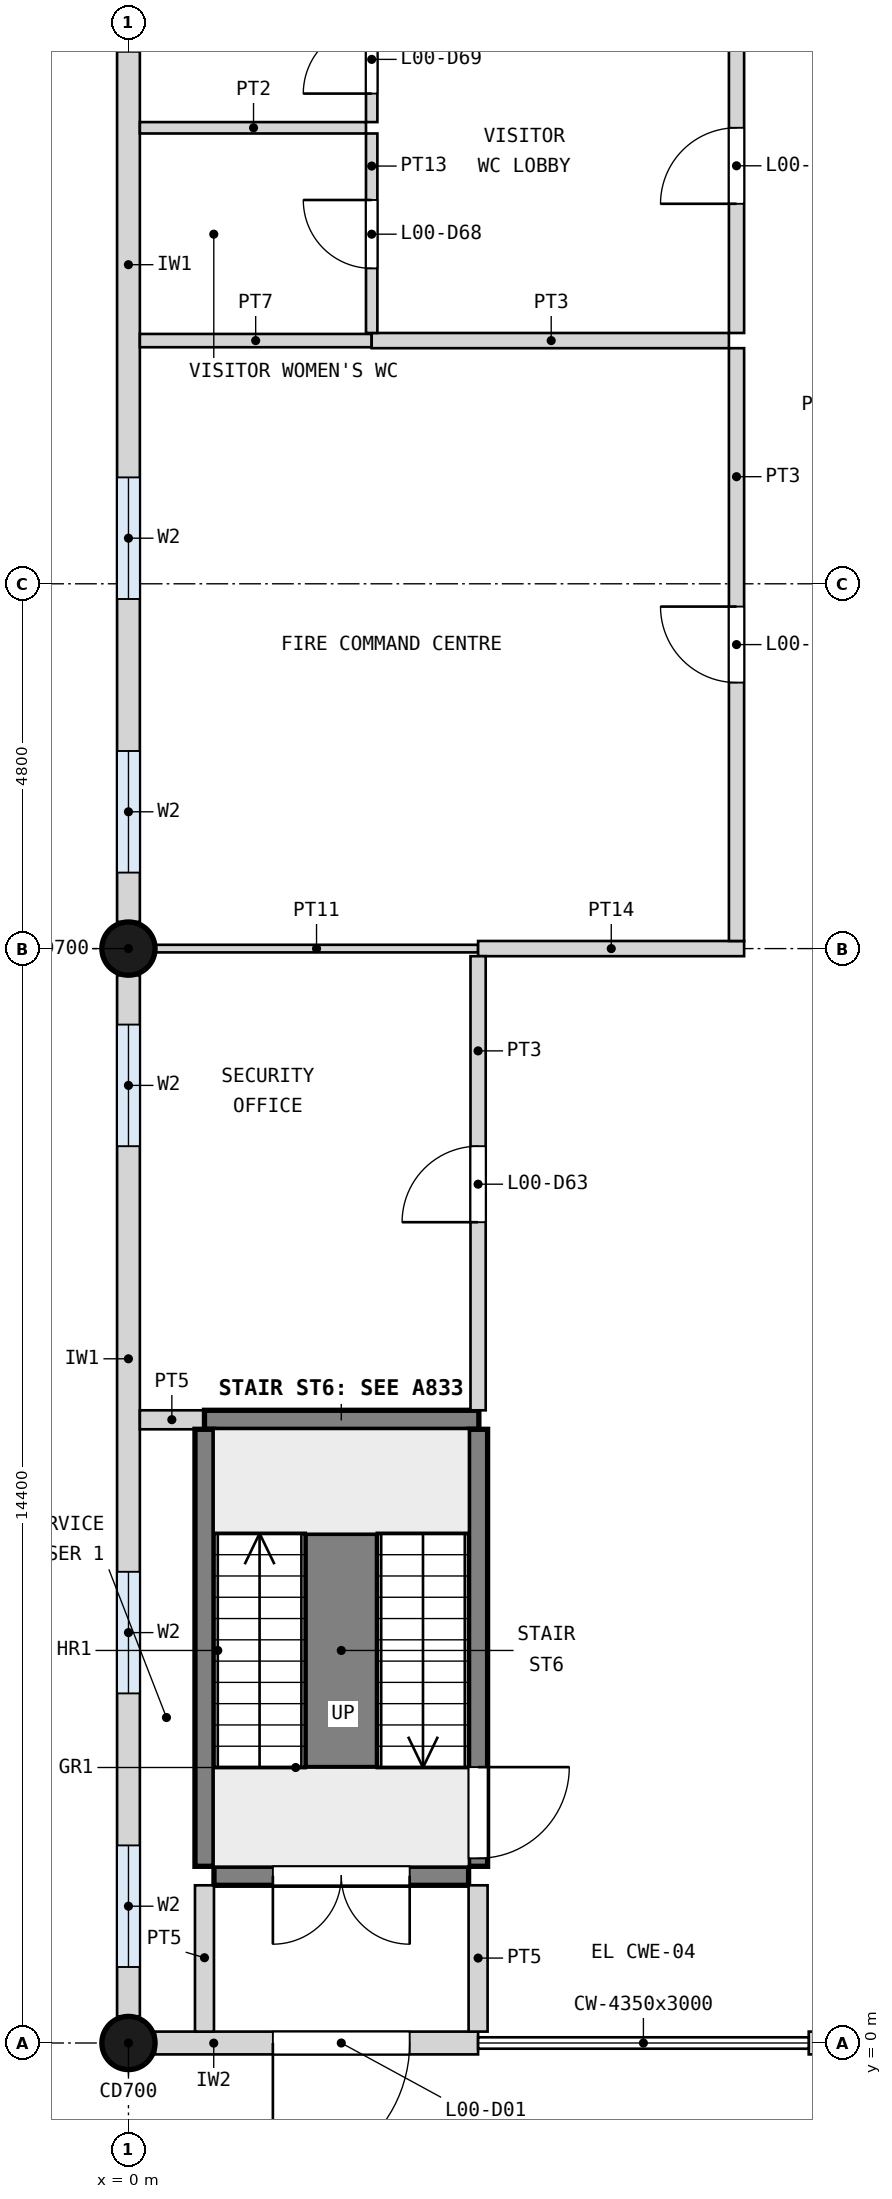
"""IFC4 building model, lengths in metres.
Left out: names, types, materials, properties, quantities, classifications, styles, units other than length and angle.
Written with IfcOpenShell. Run it as: python <this file> out.ifc"""

import sys

from ifc_helpers import new_model, si_unit, direction, frame, frame_2d, origin, origin_2d, place, context, subcontext, project, spatial, rectangle, circle, extrude, element, fill, save


model = new_model("IFC4")
c1 = context("Model", 3, precision=1e-05, world=origin(), true_north=direction((0.0, 1.0)))
c2 = subcontext(c1, "Body", "Model", "MODEL_VIEW")
j1 = project(units=[si_unit("LENGTHUNIT", "METRE"), si_unit("PLANEANGLEUNIT", "RADIAN")], contexts=[c1])
p1 = place(None, origin())
s1 = spatial("IfcSite", under=j1, at=p1, CompositionType="ELEMENT")
p2 = place(p1, origin())
s2 = spatial("IfcBuilding", under=s1, at=p2, CompositionType="ELEMENT")
p3 = place(p2, origin())
s3 = spatial("IfcBuildingStorey", under=s2, at=p3, CompositionType="ELEMENT", Elevation=0.0)
for number, where, z_axis, x_axis in (
    (1, (0.0, 0.0, 0.0), (0.0, 0.0, 1.0), (1.0, 0.0, 0.0)),
    (2, (0.0, 14.4, 0.0), (0.0, 0.0, 1.0), (1.0, 0.0, 0.0)),
):
    element("IfcColumn", number, at=place(p3, frame(where, z_axis=z_axis, x_axis=x_axis)), inside=s3, PredefinedType="COLUMN", context=c2, shape_type="SweptSolid", body=[
        extrude(circle(Radius=0.35, at=origin_2d()), origin(), (0.0, 0.0, 1.0), 4.2),
    ])
p4 = place(p3, frame((0.35, 0.0, 0.0), z_axis=(0.0, 0.0, 1.0), x_axis=(1.0, 0.0, 0.0)))
e3 = element("IfcWall", 3, at=p4, inside=s3, PredefinedType="SOLIDWALL", context=c2, shape_type="SweptSolid", body=[
    extrude(rectangle(XDim=4.25, YDim=0.3, at=frame_2d((2.125, 0.0))), origin(), (0.0, 0.0, 1.0), 3.0),
])
p5 = place(p4, frame((1.55, 0.0, 0.0)))
e4 = element("IfcOpeningElement", 4, at=p5, cuts=e3, PredefinedType="OPENING", context=c2, shape_type="SweptSolid", body=[
    extrude(rectangle(XDim=1.8, YDim=2.1, at=frame_2d((0.9, 1.05))), frame((0.0, 0.16, 0.0), z_axis=(0.0, -1.0, 0.0), x_axis=(1.0, 0.0, 0.0)), (0.0, 0.0, 1.0), 0.32),
])
p6 = place(p3, frame((8.95, 0.0, 0.0), z_axis=(0.0, 0.0, 1.0), x_axis=(1.0, 0.0, 0.0)))
e5 = element("IfcWall", 5, at=p6, inside=s3, PredefinedType="SOLIDWALL", context=c2, shape_type="SweptSolid", body=[
    extrude(rectangle(XDim=2.9, YDim=0.3, at=frame_2d((1.45, 0.0))), origin(), (0.0, 0.0, 1.0), 3.0),
])
p7 = place(p6, frame((0.25, 0.0, 0.0)))
e6 = element("IfcOpeningElement", 6, at=p7, cuts=e5, PredefinedType="OPENING", context=c2, shape_type="SweptSolid", body=[
    extrude(rectangle(XDim=2.4, YDim=2.4, at=frame_2d((1.2, 1.2))), frame((0.0, 0.16, 0.0), z_axis=(0.0, -1.0, 0.0), x_axis=(1.0, 0.0, 0.0)), (0.0, 0.0, 1.0), 0.32),
])
p8 = place(p3, frame((0.0, 0.35, 0.0), z_axis=(0.0, 0.0, 1.0), x_axis=(0.0, 1.0, 0.0)))
e7 = element("IfcWall", 7, at=p8, inside=s3, PredefinedType="SOLIDWALL", context=c2, shape_type="SweptSolid", body=[
    extrude(rectangle(XDim=13.7, YDim=0.3, at=frame_2d((6.85, 0.0))), origin(), (0.0, 0.0, 1.0), 3.0),
])
p9 = place(p8, frame((0.65, 0.0, 0.3)))
e8 = element("IfcOpeningElement", 8, at=p9, cuts=e7, PredefinedType="OPENING", context=c2, shape_type="SweptSolid", body=[
    extrude(rectangle(XDim=1.6, YDim=2.4, at=frame_2d((0.8, 1.2))), frame((0.0, 0.16, 0.0), z_axis=(0.0, -1.0, 0.0), x_axis=(1.0, 0.0, 0.0)), (0.0, 0.0, 1.0), 0.32),
])
p10 = place(p8, frame((4.25, 0.0, 0.3)))
e9 = element("IfcOpeningElement", 9, at=p10, cuts=e7, PredefinedType="OPENING", context=c2, shape_type="SweptSolid", body=[
    extrude(rectangle(XDim=1.6, YDim=2.4, at=frame_2d((0.8, 1.2))), frame((0.0, 0.16, 0.0), z_axis=(0.0, -1.0, 0.0), x_axis=(1.0, 0.0, 0.0)), (0.0, 0.0, 1.0), 0.32),
])
p11 = place(p8, frame((11.45, 0.0, 0.3)))
e10 = element("IfcOpeningElement", 10, at=p11, cuts=e7, PredefinedType="OPENING", context=c2, shape_type="SweptSolid", body=[
    extrude(rectangle(XDim=1.6, YDim=2.4, at=frame_2d((0.8, 1.2))), frame((0.0, 0.16, 0.0), z_axis=(0.0, -1.0, 0.0), x_axis=(1.0, 0.0, 0.0)), (0.0, 0.0, 1.0), 0.32),
])
p12 = place(p3, frame((0.0, 14.75, 0.0), z_axis=(0.0, 0.0, 1.0), x_axis=(0.0, 1.0, 0.0)))
e11 = element("IfcWall", 11, at=p12, inside=s3, PredefinedType="SOLIDWALL", context=c2, shape_type="SweptSolid", body=[
    extrude(rectangle(XDim=13.7, YDim=0.3, at=frame_2d((6.85, 0.0))), origin(), (0.0, 0.0, 1.0), 3.0),
])
p13 = place(p12, frame((0.65, 0.0, 0.3)))
e12 = element("IfcOpeningElement", 12, at=p13, cuts=e11, PredefinedType="OPENING", context=c2, shape_type="SweptSolid", body=[
    extrude(rectangle(XDim=1.6, YDim=2.4, at=frame_2d((0.8, 1.2))), frame((0.0, 0.16, 0.0), z_axis=(0.0, -1.0, 0.0), x_axis=(1.0, 0.0, 0.0)), (0.0, 0.0, 1.0), 0.32),
])
p14 = place(p12, frame((4.25, 0.0, 0.3)))
e13 = element("IfcOpeningElement", 13, at=p14, cuts=e11, PredefinedType="OPENING", context=c2, shape_type="SweptSolid", body=[
    extrude(rectangle(XDim=1.6, YDim=2.4, at=frame_2d((0.8, 1.2))), frame((0.0, 0.16, 0.0), z_axis=(0.0, -1.0, 0.0), x_axis=(1.0, 0.0, 0.0)), (0.0, 0.0, 1.0), 0.32),
])
p15 = place(p12, frame((11.45, 0.0, 0.3)))
e14 = element("IfcOpeningElement", 14, at=p15, cuts=e11, PredefinedType="OPENING", context=c2, shape_type="SweptSolid", body=[
    extrude(rectangle(XDim=1.6, YDim=2.4, at=frame_2d((0.8, 1.2))), frame((0.0, 0.16, 0.0), z_axis=(0.0, -1.0, 0.0), x_axis=(1.0, 0.0, 0.0)), (0.0, 0.0, 1.0), 0.32),
])
p16 = place(p3, frame((1.125, 2.2, 0.0), z_axis=(0.0, 0.0, 1.0), x_axis=(1.0, 0.0, 0.0)))
e15 = element("IfcWall", 15, at=p16, inside=s3, PredefinedType="SHEAR", context=c2, shape_type="SweptSolid", body=[
    extrude(rectangle(XDim=3.35, YDim=0.25, at=frame_2d((1.675, 0.0))), origin(), (0.0, 0.0, 1.0), 3.9),
])
p17 = place(p16, frame((0.775, 0.0, 0.0)))
e16 = element("IfcOpeningElement", 16, at=p17, cuts=e15, PredefinedType="OPENING", context=c2, shape_type="SweptSolid", body=[
    extrude(rectangle(XDim=1.8, YDim=2.1, at=frame_2d((0.9, 1.05))), frame((0.0, 0.135, 0.0), z_axis=(0.0, -1.0, 0.0), x_axis=(1.0, 0.0, 0.0)), (0.0, 0.0, 1.0), 0.27),
])
p18 = place(p3, frame((0.15, 8.2, 0.0), z_axis=(0.0, 0.0, 1.0), x_axis=(1.0, 0.0, 0.0)))
e17 = element("IfcWall", 17, at=p18, inside=s3, PredefinedType="PARTITIONING", context=c2, shape_type="SweptSolid", body=[
    extrude(rectangle(XDim=0.85, YDim=0.25, at=frame_2d((0.425, 0.0))), origin(), (0.0, 0.0, 1.0), 3.9),
])
p19 = place(p3, frame((1.0, 8.2, 0.0), z_axis=(0.0, 0.0, 1.0), x_axis=(1.0, 0.0, 0.0)))
e18 = element("IfcWall", 18, at=p19, inside=s3, PredefinedType="SHEAR", context=c2, shape_type="SweptSolid", body=[
    extrude(rectangle(XDim=3.61, YDim=0.25, at=frame_2d((1.805, 0.0))), origin(), (0.0, 0.0, 1.0), 3.9),
])
p20 = place(p3, frame((0.32, 14.4, 0.0), z_axis=(0.0, 0.0, 1.0), x_axis=(1.0, 0.0, 0.0)))
e19 = element("IfcWall", 19, at=p20, inside=s3, PredefinedType="PARTITIONING", context=c2, shape_type="SweptSolid", body=[
    extrude(rectangle(XDim=4.28, YDim=0.1, at=frame_2d((2.14, 0.0))), origin(), (0.0, 0.0, 1.0), 3.1),
])
p21 = place(p3, frame((4.6, 14.4, 0.0), z_axis=(0.0, 0.0, 1.0), x_axis=(1.0, 0.0, 0.0)))
e20 = element("IfcWall", 20, at=p21, inside=s3, PredefinedType="PARTITIONING", context=c2, shape_type="SweptSolid", body=[
    extrude(rectangle(XDim=3.5, YDim=0.2, at=frame_2d((1.75, 0.0))), origin(), (0.0, 0.0, 1.0), 3.1),
])
p22 = place(p3, frame((0.15, 22.4, 0.0), z_axis=(0.0, 0.0, 1.0), x_axis=(1.0, 0.0, 0.0)))
e21 = element("IfcWall", 21, at=p22, inside=s3, PredefinedType="PARTITIONING", context=c2, shape_type="SweptSolid", body=[
    extrude(rectangle(XDim=3.05, YDim=0.175, at=frame_2d((1.525, 0.0))), origin(), (0.0, 0.0, 1.0), 3.9),
])
p23 = place(p3, frame((3.2, 22.4, 0.0), z_axis=(0.0, 0.0, 1.0), x_axis=(1.0, 0.0, 0.0)))
e22 = element("IfcWall", 22, at=p23, inside=s3, PredefinedType="PARTITIONING", context=c2, shape_type="SweptSolid", body=[
    extrude(rectangle(XDim=4.7, YDim=0.2, at=frame_2d((2.35, 0.0))), origin(), (0.0, 0.0, 1.0), 3.9),
])
p24 = place(p3, frame((0.15, 25.2, 0.0), z_axis=(0.0, 0.0, 1.0), x_axis=(1.0, 0.0, 0.0)))
e23 = element("IfcWall", 23, at=p24, inside=s3, PredefinedType="PARTITIONING", context=c2, shape_type="SweptSolid", body=[
    extrude(rectangle(XDim=2.975, YDim=0.15, at=frame_2d((1.488, 0.0))), origin(), (0.0, 0.0, 1.0), 3.9),
])
p25 = place(p3, frame((1.0, 0.15, 0.0), z_axis=(0.0, 0.0, 1.0), x_axis=(0.0, 1.0, 0.0)))
e24 = element("IfcWall", 24, at=p25, inside=s3, PredefinedType="PARTITIONING", context=c2, shape_type="SweptSolid", body=[
    extrude(rectangle(XDim=1.925, YDim=0.25, at=frame_2d((0.962, 0.0))), origin(), (0.0, 0.0, 1.0), 3.9),
])
p26 = place(p3, frame((1.0, 2.325, 0.0), z_axis=(0.0, 0.0, 1.0), x_axis=(0.0, 1.0, 0.0)))
e25 = element("IfcWall", 25, at=p26, inside=s3, PredefinedType="SHEAR", context=c2, shape_type="SweptSolid", body=[
    extrude(rectangle(XDim=5.75, YDim=0.25, at=frame_2d((2.875, 0.0))), origin(), (0.0, 0.0, 1.0), 3.9),
])
p27 = place(p3, frame((3.2, 22.5, 0.0), z_axis=(0.0, 0.0, 1.0), x_axis=(0.0, 1.0, 0.0)))
e26 = element("IfcWall", 26, at=p27, inside=s3, PredefinedType="PARTITIONING", context=c2, shape_type="SweptSolid", body=[
    extrude(rectangle(XDim=2.625, YDim=0.15, at=frame_2d((1.312, 0.0))), origin(), (0.0, 0.0, 1.0), 3.0),
])
p28 = place(p27, frame((0.85, 0.0, 0.0)))
e27 = element("IfcOpeningElement", 27, at=p28, cuts=e26, PredefinedType="OPENING", context=c2, shape_type="SweptSolid", body=[
    extrude(rectangle(XDim=0.9, YDim=2.1, at=frame_2d((0.45, 1.05))), frame((0.0, 0.085, 0.0), z_axis=(0.0, -1.0, 0.0), x_axis=(1.0, 0.0, 0.0)), (0.0, 0.0, 1.0), 0.17),
])
p29 = place(p3, frame((3.2, 25.275, 0.0), z_axis=(0.0, 0.0, 1.0), x_axis=(0.0, 1.0, 0.0)))
e28 = element("IfcWall", 28, at=p29, inside=s3, PredefinedType="PARTITIONING", context=c2, shape_type="SweptSolid", body=[
    extrude(rectangle(XDim=1.65, YDim=0.15, at=frame_2d((0.825, 0.0))), origin(), (0.0, 0.0, 1.0), 3.0),
])
p30 = place(p29, frame((0.375, 0.0, 0.0)))
e29 = element("IfcOpeningElement", 29, at=p30, cuts=e28, PredefinedType="OPENING", context=c2, shape_type="SweptSolid", body=[
    extrude(rectangle(XDim=0.9, YDim=2.1, at=frame_2d((0.45, 1.05))), frame((0.0, 0.085, 0.0), z_axis=(0.0, -1.0, 0.0), x_axis=(1.0, 0.0, 0.0)), (0.0, 0.0, 1.0), 0.17),
])
p31 = place(p3, frame((4.6, 0.15, 0.0), z_axis=(0.0, 0.0, 1.0), x_axis=(0.0, 1.0, 0.0)))
e30 = element("IfcWall", 30, at=p31, inside=s3, PredefinedType="PARTITIONING", context=c2, shape_type="SweptSolid", body=[
    extrude(rectangle(XDim=1.925, YDim=0.25, at=frame_2d((0.962, 0.0))), origin(), (0.0, 0.0, 1.0), 3.9),
])
p32 = place(p3, frame((4.6, 2.325, 0.0), z_axis=(0.0, 0.0, 1.0), x_axis=(0.0, 1.0, 0.0)))
e31 = element("IfcWall", 31, at=p32, inside=s3, PredefinedType="SHEAR", context=c2, shape_type="SweptSolid", body=[
    extrude(rectangle(XDim=5.75, YDim=0.25, at=frame_2d((2.875, 0.0))), origin(), (0.0, 0.0, 1.0), 3.9),
])
p33 = place(p32, frame((0.105, 0.0, 0.0)))
e32 = element("IfcOpeningElement", 32, at=p33, cuts=e31, PredefinedType="OPENING", context=c2, shape_type="SweptSolid", body=[
    extrude(rectangle(XDim=1.2, YDim=2.1, at=frame_2d((0.6, 1.05))), frame((0.0, 0.135, 0.0), z_axis=(0.0, -1.0, 0.0), x_axis=(1.0, 0.0, 0.0)), (0.0, 0.0, 1.0), 0.27),
])
p34 = place(p3, frame((4.6, 8.325, 0.0), z_axis=(0.0, 0.0, 1.0), x_axis=(0.0, 1.0, 0.0)))
e33 = element("IfcWall", 33, at=p34, inside=s3, PredefinedType="PARTITIONING", context=c2, shape_type="SweptSolid", body=[
    extrude(rectangle(XDim=5.975, YDim=0.2, at=frame_2d((2.988, 0.0))), origin(), (0.0, 0.0, 1.0), 3.9),
])
p35 = place(p34, frame((2.475, 0.0, 0.0)))
e34 = element("IfcOpeningElement", 34, at=p35, cuts=e33, PredefinedType="OPENING", context=c2, shape_type="SweptSolid", body=[
    extrude(rectangle(XDim=1.0, YDim=2.1, at=frame_2d((0.5, 1.05))), frame((0.0, 0.11, 0.0), z_axis=(0.0, -1.0, 0.0), x_axis=(1.0, 0.0, 0.0)), (0.0, 0.0, 1.0), 0.22),
])
p36 = place(p3, frame((8.0, 14.5, 0.0), z_axis=(0.0, 0.0, 1.0), x_axis=(0.0, 1.0, 0.0)))
e35 = element("IfcWall", 35, at=p36, inside=s3, PredefinedType="PARTITIONING", context=c2, shape_type="SweptSolid", body=[
    extrude(rectangle(XDim=7.8, YDim=0.2, at=frame_2d((3.9, 0.0))), origin(), (0.0, 0.0, 1.0), 3.9),
])
p37 = place(p36, frame((3.4, 0.0, 0.0)))
e36 = element("IfcOpeningElement", 36, at=p37, cuts=e35, PredefinedType="OPENING", context=c2, shape_type="SweptSolid", body=[
    extrude(rectangle(XDim=1.0, YDim=2.1, at=frame_2d((0.5, 1.05))), frame((0.0, 0.11, 0.0), z_axis=(0.0, -1.0, 0.0), x_axis=(1.0, 0.0, 0.0)), (0.0, 0.0, 1.0), 0.22),
])
p38 = place(p3, frame((8.0, 22.5, 0.0), z_axis=(0.0, 0.0, 1.0), x_axis=(0.0, 1.0, 0.0)))
e37 = element("IfcWall", 37, at=p38, inside=s3, PredefinedType="PARTITIONING", context=c2, shape_type="SweptSolid", body=[
    extrude(rectangle(XDim=4.425, YDim=0.2, at=frame_2d((2.212, 0.0))), origin(), (0.0, 0.0, 1.0), 3.9),
])
p39 = place(p38, frame((1.7, 0.0, 0.0)))
e38 = element("IfcOpeningElement", 38, at=p39, cuts=e37, PredefinedType="OPENING", context=c2, shape_type="SweptSolid", body=[
    extrude(rectangle(XDim=1.0, YDim=2.1, at=frame_2d((0.5, 1.05))), frame((0.0, 0.11, 0.0), z_axis=(0.0, -1.0, 0.0), x_axis=(1.0, 0.0, 0.0)), (0.0, 0.0, 1.0), 0.22),
])
p40 = place(p3, frame((2.8, 3.625, 0.0), z_axis=(0.0, 0.0, 1.0), x_axis=(0.0, 1.0, 0.0)))
e39 = element("IfcWall", 39, at=p40, inside=s3, PredefinedType="SHEAR", context=c2, shape_type="SweptSolid", body=[
    extrude(rectangle(XDim=3.08, YDim=0.95, at=frame_2d((1.54, 0.0))), origin(), (0.0, 0.0, 1.0), 4.2),
])
p41 = place(p5, frame((1.8, 0.0, 0.0), z_axis=(0.0, 0.0, 1.0), x_axis=(-1.0, 0.0, 0.0)))
e40 = element("IfcDoor", 40, at=p41, inside=s3, OperationType="SINGLE_SWING_RIGHT", PredefinedType="DOOR", context=c2, shape_type="SweptSolid", body=[
    extrude(rectangle(XDim=1.8, YDim=2.1, at=frame_2d((0.9, 1.05))), frame((0.0, 0.025, 0.0), z_axis=(0.0, -1.0, 0.0), x_axis=(1.0, 0.0, 0.0)), (0.0, 0.0, 1.0), 0.05),
])
fill(e4, e40)
p42 = place(p33, frame((1.2, 0.0, 0.0), z_axis=(0.0, 0.0, 1.0), x_axis=(-1.0, 0.0, 0.0)))
e41 = element("IfcDoor", 41, at=p42, inside=s3, OperationType="SINGLE_SWING_LEFT", PredefinedType="DOOR", context=c2, shape_type="SweptSolid", body=[
    extrude(rectangle(XDim=1.2, YDim=2.1, at=frame_2d((0.6, 1.05))), frame((0.0, 0.025, 0.0), z_axis=(0.0, -1.0, 0.0), x_axis=(1.0, 0.0, 0.0)), (0.0, 0.0, 1.0), 0.05),
])
fill(e32, e41)
p43 = place(p17, frame((1.8, 0.0, 0.0), z_axis=(0.0, 0.0, 1.0), x_axis=(-1.0, 0.0, 0.0)))
e42 = element("IfcDoor", 42, at=p43, inside=s3, OperationType="DOUBLE_DOOR_SINGLE_SWING", PredefinedType="DOOR", context=c2, shape_type="SweptSolid", body=[
    extrude(rectangle(XDim=1.8, YDim=2.1, at=frame_2d((0.9, 1.05))), frame((0.0, 0.025, 0.0), z_axis=(0.0, -1.0, 0.0), x_axis=(1.0, 0.0, 0.0)), (0.0, 0.0, 1.0), 0.05),
])
fill(e16, e42)
p44 = place(p35, origin())
e43 = element("IfcDoor", 43, at=p44, inside=s3, OperationType="SINGLE_SWING_LEFT", PredefinedType="DOOR", context=c2, shape_type="SweptSolid", body=[
    extrude(rectangle(XDim=1.0, YDim=2.1, at=frame_2d((0.5, 1.05))), frame((0.0, 0.025, 0.0), z_axis=(0.0, -1.0, 0.0), x_axis=(1.0, 0.0, 0.0)), (0.0, 0.0, 1.0), 0.05),
])
fill(e34, e43)
p45 = place(p37, origin())
e44 = element("IfcDoor", 44, at=p45, inside=s3, OperationType="SINGLE_SWING_RIGHT", PredefinedType="DOOR", context=c2, shape_type="SweptSolid", body=[
    extrude(rectangle(XDim=1.0, YDim=2.1, at=frame_2d((0.5, 1.05))), frame((0.0, 0.025, 0.0), z_axis=(0.0, -1.0, 0.0), x_axis=(1.0, 0.0, 0.0)), (0.0, 0.0, 1.0), 0.05),
])
fill(e36, e44)
p46 = place(p39, origin())
e45 = element("IfcDoor", 45, at=p46, inside=s3, OperationType="SINGLE_SWING_LEFT", PredefinedType="DOOR", context=c2, shape_type="SweptSolid", body=[
    extrude(rectangle(XDim=1.0, YDim=2.1, at=frame_2d((0.5, 1.05))), frame((0.0, 0.025, 0.0), z_axis=(0.0, -1.0, 0.0), x_axis=(1.0, 0.0, 0.0)), (0.0, 0.0, 1.0), 0.05),
])
fill(e38, e45)
p47 = place(p28, origin())
e46 = element("IfcDoor", 46, at=p47, inside=s3, OperationType="SINGLE_SWING_RIGHT", PredefinedType="DOOR", context=c2, shape_type="SweptSolid", body=[
    extrude(rectangle(XDim=0.9, YDim=2.1, at=frame_2d((0.45, 1.05))), frame((0.0, 0.025, 0.0), z_axis=(0.0, -1.0, 0.0), x_axis=(1.0, 0.0, 0.0)), (0.0, 0.0, 1.0), 0.05),
])
fill(e27, e46)
p48 = place(p30, origin())
e47 = element("IfcDoor", 47, at=p48, inside=s3, OperationType="SINGLE_SWING_LEFT", PredefinedType="DOOR", context=c2, shape_type="SweptSolid", body=[
    extrude(rectangle(XDim=0.9, YDim=2.1, at=frame_2d((0.45, 1.05))), frame((0.0, 0.025, 0.0), z_axis=(0.0, -1.0, 0.0), x_axis=(1.0, 0.0, 0.0)), (0.0, 0.0, 1.0), 0.05),
])
fill(e29, e47)
p49 = place(p9, origin())
e48 = element("IfcWindow", 48, at=p49, inside=s3, PartitioningType="SINGLE_PANEL", PredefinedType="WINDOW", context=c2, shape_type="SweptSolid", body=[
    extrude(rectangle(XDim=1.6, YDim=2.4, at=frame_2d((0.8, 1.2))), frame((0.0, 0.03, 0.0), z_axis=(0.0, -1.0, 0.0), x_axis=(1.0, 0.0, 0.0)), (0.0, 0.0, 1.0), 0.06),
])
fill(e8, e48)
p50 = place(p10, origin())
e49 = element("IfcWindow", 49, at=p50, inside=s3, PartitioningType="SINGLE_PANEL", PredefinedType="WINDOW", context=c2, shape_type="SweptSolid", body=[
    extrude(rectangle(XDim=1.6, YDim=2.4, at=frame_2d((0.8, 1.2))), frame((0.0, 0.03, 0.0), z_axis=(0.0, -1.0, 0.0), x_axis=(1.0, 0.0, 0.0)), (0.0, 0.0, 1.0), 0.06),
])
fill(e9, e49)
p51 = place(p11, origin())
e50 = element("IfcWindow", 50, at=p51, inside=s3, PartitioningType="SINGLE_PANEL", PredefinedType="WINDOW", context=c2, shape_type="SweptSolid", body=[
    extrude(rectangle(XDim=1.6, YDim=2.4, at=frame_2d((0.8, 1.2))), frame((0.0, 0.03, 0.0), z_axis=(0.0, -1.0, 0.0), x_axis=(1.0, 0.0, 0.0)), (0.0, 0.0, 1.0), 0.06),
])
fill(e10, e50)
p52 = place(p13, origin())
e51 = element("IfcWindow", 51, at=p52, inside=s3, PartitioningType="SINGLE_PANEL", PredefinedType="WINDOW", context=c2, shape_type="SweptSolid", body=[
    extrude(rectangle(XDim=1.6, YDim=2.4, at=frame_2d((0.8, 1.2))), frame((0.0, 0.03, 0.0), z_axis=(0.0, -1.0, 0.0), x_axis=(1.0, 0.0, 0.0)), (0.0, 0.0, 1.0), 0.06),
])
fill(e12, e51)
p53 = place(p14, origin())
e52 = element("IfcWindow", 52, at=p53, inside=s3, PartitioningType="SINGLE_PANEL", PredefinedType="WINDOW", context=c2, shape_type="SweptSolid", body=[
    extrude(rectangle(XDim=1.6, YDim=2.4, at=frame_2d((0.8, 1.2))), frame((0.0, 0.03, 0.0), z_axis=(0.0, -1.0, 0.0), x_axis=(1.0, 0.0, 0.0)), (0.0, 0.0, 1.0), 0.06),
])
fill(e13, e52)
save(model, sys.argv[1])
